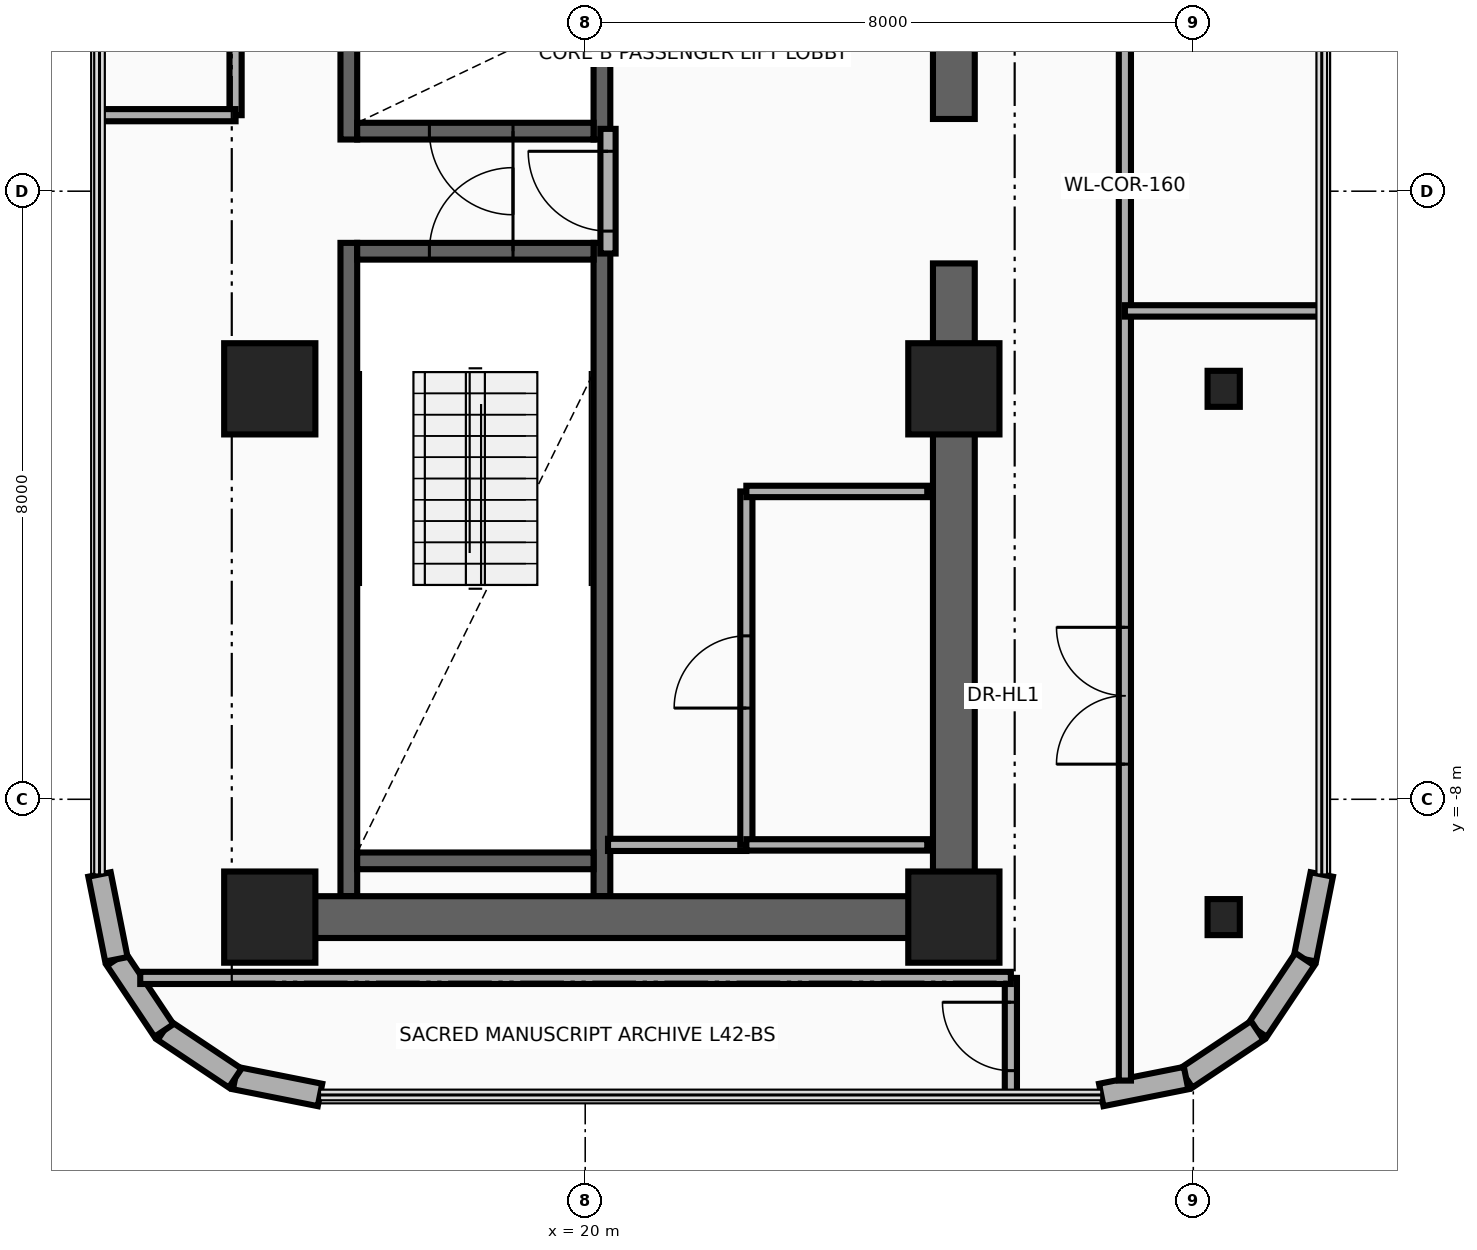
"""IFC4 building model, lengths in metres.
Left out: names, types, materials, properties, quantities, classifications, styles, units other than length and angle.
Written with IfcOpenShell. Run it as: python <this file> out.ifc"""

import sys

from ifc_helpers import new_model, si_unit, direction, frame, frame_2d, origin, origin_2d, place, context, subcontext, project, spatial, rectangle, i_section, extrude, source, transform, mapped, element, fill, save


model = new_model("IFC4")
c1 = context("Model", 3, precision=1e-05, world=origin(), true_north=direction((0.0, 1.0)))
c2 = subcontext(c1, "Body", "Model", "MODEL_VIEW")
j1 = project(units=[si_unit("LENGTHUNIT", "METRE"), si_unit("PLANEANGLEUNIT", "RADIAN")], contexts=[c1])
p1 = place(None, origin())
s1 = spatial("IfcSite", under=j1, at=p1, CompositionType="ELEMENT")
p2 = place(p1, origin())
s2 = spatial("IfcBuilding", under=s1, at=p2, CompositionType="ELEMENT")
p3 = place(p2, frame((0.0, 0.0, 164.9)))
s3 = spatial("IfcBuildingStorey", under=s2, at=p3, CompositionType="ELEMENT", Elevation=164.9)
for number, where, z_axis, x_axis in (
    (1, (16.89, 0.68, 0.0), (0.0, 0.0, 1.0), (0.0, 1.0, 0.0)),
    (2, (20.22, 0.68, 0.0), (0.0, 0.0, 1.0), (0.0, 1.0, 0.0)),
):
    element("IfcWall", number, at=place(p3, frame(where, z_axis=z_axis, x_axis=x_axis)), inside=s3, PredefinedType="SHEAR", context=c2, shape_type="SweptSolid", body=[
        extrude(rectangle(XDim=8.595, YDim=0.22, at=frame_2d((4.297, 0.0))), origin(), (0.0, 0.0, 1.0), 3.46),
    ])
p4 = place(p3, frame((17.0, 0.79, 0.0), z_axis=(0.0, 0.0, 1.0), x_axis=(1.0, 0.0, 0.0)))
e3 = element("IfcWall", 3, at=p4, inside=s3, PredefinedType="SHEAR", context=c2, shape_type="SweptSolid", body=[
    extrude(rectangle(XDim=3.11, YDim=0.22, at=frame_2d((1.555, 0.0))), origin(), (0.0, 0.0, 1.0), 3.46),
])
p5 = place(p4, frame((0.95, 0.0, 0.0)))
e4 = element("IfcOpeningElement", 4, at=p5, cuts=e3, PredefinedType="OPENING", context=c2, shape_type="SweptSolid", body=[
    extrude(rectangle(XDim=1.1, YDim=2.15, at=frame_2d((0.55, 1.075))), frame((0.0, 0.125, 0.0), z_axis=(0.0, -1.0, 0.0), x_axis=(1.0, 0.0, 0.0)), (0.0, 0.0, 1.0), 0.25),
])
for number, where, z_axis, x_axis in (
    (5, (16.89, -9.275, 0.0), (0.0, 0.0, 1.0), (0.0, 1.0, 0.0)),
    (6, (20.22, -9.275, 0.0), (0.0, 0.0, 1.0), (0.0, 1.0, 0.0)),
):
    element("IfcWall", number, at=place(p3, frame(where, z_axis=z_axis, x_axis=x_axis)), inside=s3, PredefinedType="SHEAR", context=c2, shape_type="SweptSolid", body=[
        extrude(rectangle(XDim=8.595, YDim=0.22, at=frame_2d((4.297, 0.0))), origin(), (0.0, 0.0, 1.0), 3.46),
    ])
p6 = place(p3, frame((17.0, -8.81, 0.0), z_axis=(0.0, 0.0, 1.0), x_axis=(1.0, 0.0, 0.0)))
e7 = element("IfcWall", 7, at=p6, inside=s3, PredefinedType="SHEAR", context=c2, shape_type="SweptSolid", body=[
    extrude(rectangle(XDim=3.11, YDim=0.22, at=frame_2d((1.555, 0.0))), origin(), (0.0, 0.0, 1.0), 3.46),
])
p7 = place(p3, frame((17.0, -0.79, 0.0), z_axis=(0.0, 0.0, 1.0), x_axis=(1.0, 0.0, 0.0)))
e8 = element("IfcWall", 8, at=p7, inside=s3, PredefinedType="SHEAR", context=c2, shape_type="SweptSolid", body=[
    extrude(rectangle(XDim=3.11, YDim=0.22, at=frame_2d((1.555, 0.0))), origin(), (0.0, 0.0, 1.0), 3.46),
])
p8 = place(p7, frame((0.95, 0.0, 0.0)))
e9 = element("IfcOpeningElement", 9, at=p8, cuts=e8, PredefinedType="OPENING", context=c2, shape_type="SweptSolid", body=[
    extrude(rectangle(XDim=1.1, YDim=2.15, at=frame_2d((0.55, 1.075))), frame((0.0, 0.125, 0.0), z_axis=(0.0, -1.0, 0.0), x_axis=(1.0, 0.0, 0.0)), (0.0, 0.0, 1.0), 0.25),
])
for number, where, z_axis, x_axis in (
    (10, (24.85, -9.825, 0.0), (0.0, 0.0, 1.0), (0.0, 1.0, 0.0)),
    (11, (24.85, 0.95, 0.0), (0.0, 0.0, 1.0), (0.0, 1.0, 0.0)),
):
    element("IfcWall", number, at=place(p3, frame(where, z_axis=z_axis, x_axis=x_axis)), inside=s3, PredefinedType="SHEAR", context=c2, shape_type="SweptSolid", body=[
        extrude(rectangle(XDim=8.875, YDim=0.55, at=frame_2d((4.438, 0.0))), origin(), (0.0, 0.0, 1.0), 3.46),
    ])
p9 = place(p3, frame((15.85, -9.55, 0.0), z_axis=(0.0, 0.0, 1.0), x_axis=(1.0, 0.0, 0.0)))
e12 = element("IfcWall", 12, at=p9, inside=s3, PredefinedType="SHEAR", context=c2, shape_type="SweptSolid", body=[
    extrude(rectangle(XDim=9.0, YDim=0.55, at=frame_2d((4.5, 0.0))), origin(), (0.0, 0.0, 1.0), 3.46),
])
m1 = source(origin(), c2, "Body", "SweptSolid", [
    extrude(rectangle(XDim=1.2, YDim=1.2, at=origin_2d()), origin(), (0.0, 0.0, 1.0), 3.7),
])
for number, where, z_axis, x_axis in (
    (13, (15.85, -9.55, 0.0), (0.0, 0.0, 1.0), (1.0, 0.0, 0.0)),
    (14, (24.85, -9.55, 0.0), (0.0, 0.0, 1.0), (1.0, 0.0, 0.0)),
):
    element("IfcColumn", number, at=place(p3, frame(where, z_axis=z_axis, x_axis=x_axis)), inside=s3, PredefinedType="COLUMN", context=c2, shape_type="MappedRepresentation", body=[
        mapped(m1, transform((0.0, 0.0, 0.0), x_axis=(1.0, 0.0, 0.0), y_axis=(0.0, 1.0, 0.0), z_axis=(0.0, 0.0, 1.0), scale=1.0)),
    ])
m2 = source(origin(), c2, "Body", "SweptSolid", [
    extrude(i_section(OverallWidth=0.424, OverallDepth=0.474, WebThickness=0.048, FlangeThickness=0.077, at=origin_2d()), origin(), (0.0, 0.0, 1.0), 3.7),
])
p10 = place(p3, frame((28.4, -9.55, 0.0), z_axis=(0.0, 0.0, 1.0), x_axis=(1.0, 0.0, 0.0)))
e15 = element("IfcColumn", 15, at=p10, inside=s3, PredefinedType="COLUMN", context=c2, shape_type="MappedRepresentation", body=[
    mapped(m2, transform((0.0, 0.0, 0.0), x_axis=(1.0, 0.0, 0.0), y_axis=(0.0, 1.0, 0.0), z_axis=(0.0, 0.0, 1.0), scale=1.0)),
])
for number, where, z_axis, x_axis in (
    (16, (15.85, -2.6, 0.0), (0.0, 0.0, 1.0), (1.0, 0.0, 0.0)),
    (17, (24.85, -2.6, 0.0), (0.0, 0.0, 1.0), (1.0, 0.0, 0.0)),
):
    element("IfcColumn", number, at=place(p3, frame(where, z_axis=z_axis, x_axis=x_axis)), inside=s3, PredefinedType="COLUMN", context=c2, shape_type="MappedRepresentation", body=[
        mapped(m1, transform((0.0, 0.0, 0.0), x_axis=(1.0, 0.0, 0.0), y_axis=(0.0, 1.0, 0.0), z_axis=(0.0, 0.0, 1.0), scale=1.0)),
    ])
p11 = place(p3, frame((28.4, -2.6, 0.0), z_axis=(0.0, 0.0, 1.0), x_axis=(1.0, 0.0, 0.0)))
e18 = element("IfcColumn", 18, at=p11, inside=s3, PredefinedType="COLUMN", context=c2, shape_type="MappedRepresentation", body=[
    mapped(m2, transform((0.0, 0.0, 0.0), x_axis=(1.0, 0.0, 0.0), y_axis=(0.0, 1.0, 0.0), z_axis=(0.0, 0.0, 1.0), scale=1.0)),
])
p12 = place(p3, frame((29.69, -8.989, 0.0), z_axis=(0.0, 0.0, 1.0), x_axis=(-0.195043173023, -0.980794657743, 0.0)))
e19 = element("IfcWall", 19, at=p12, inside=s3, PredefinedType="SOLIDWALL", context=c2, shape_type="SweptSolid", body=[
    extrude(rectangle(XDim=1.138, YDim=0.3, at=frame_2d((0.569, 0.0))), origin(), (0.0, 0.0, 1.0), 3.46),
])
for number, where, z_axis, x_axis in (
    (20, (29.468, -10.105, 0.0), (0.0, 0.0, 1.0), (-0.556, -0.831, 0.0)),
    (21, (28.842, -11.042, 0.0), (0.0, 0.0, 1.0), (-0.831, -0.556, 0.0)),
):
    element("IfcWall", number, at=place(p3, frame(where, z_axis=z_axis, x_axis=x_axis)), inside=s3, PredefinedType="SOLIDWALL", context=c2, shape_type="SweptSolid", body=[
        extrude(rectangle(XDim=1.127, YDim=0.3, at=frame_2d((0.563, 0.0))), origin(), (0.0, 0.0, 1.0), 3.46),
    ])
for number, where, z_axis, x_axis in (
    (22, (27.905, -11.668, 0.0), (0.0, 0.0, 1.0), (-0.981, -0.195, 0.0)),
    (23, (16.511, -11.89, 0.0), (0.0, 0.0, 1.0), (-0.981, 0.195, 0.0)),
):
    element("IfcWall", number, at=place(p3, frame(where, z_axis=z_axis, x_axis=x_axis)), inside=s3, PredefinedType="SOLIDWALL", context=c2, shape_type="SweptSolid", body=[
        extrude(rectangle(XDim=1.138, YDim=0.3, at=frame_2d((0.569, 0.0))), origin(), (0.0, 0.0, 1.0), 3.46),
    ])
for number, where, z_axis, x_axis in (
    (24, (15.395, -11.668, 0.0), (0.0, 0.0, 1.0), (-0.831, 0.556, 0.0)),
    (25, (14.458, -11.042, 0.0), (0.0, 0.0, 1.0), (-0.556, 0.831, 0.0)),
):
    element("IfcWall", number, at=place(p3, frame(where, z_axis=z_axis, x_axis=x_axis)), inside=s3, PredefinedType="SOLIDWALL", context=c2, shape_type="SweptSolid", body=[
        extrude(rectangle(XDim=1.127, YDim=0.3, at=frame_2d((0.563, 0.0))), origin(), (0.0, 0.0, 1.0), 3.46),
    ])
p13 = place(p3, frame((13.832, -10.105, 0.0), z_axis=(0.0, 0.0, 1.0), x_axis=(-0.195043173023, 0.980794657743, 0.0)))
e26 = element("IfcWall", 26, at=p13, inside=s3, PredefinedType="SOLIDWALL", context=c2, shape_type="SweptSolid", body=[
    extrude(rectangle(XDim=1.138, YDim=0.3, at=frame_2d((0.569, 0.0))), origin(), (0.0, 0.0, 1.0), 3.46),
])
p14 = place(p3, frame((20.3, -0.82, 0.0), z_axis=(0.0, 0.0, 1.0), x_axis=(0.0, 1.0, 0.0)))
e27 = element("IfcWall", 27, at=p14, inside=s3, PredefinedType="PARTITIONING", context=c2, shape_type="SweptSolid", body=[
    extrude(rectangle(XDim=1.64, YDim=0.2, at=frame_2d((0.82, 0.0))), origin(), (0.0, 0.0, 1.0), 3.46),
])
p15 = place(p14, frame((0.295, 0.0, 0.0)))
e28 = element("IfcOpeningElement", 28, at=p15, cuts=e27, PredefinedType="OPENING", context=c2, shape_type="SweptSolid", body=[
    extrude(rectangle(XDim=1.05, YDim=2.15, at=frame_2d((0.525, 1.075))), frame((0.0, 0.115, 0.0), z_axis=(0.0, -1.0, 0.0), x_axis=(1.0, 0.0, 0.0)), (0.0, 0.0, 1.0), 0.23),
])
p16 = place(p3, frame((20.3, -8.6, 0.0), z_axis=(0.0, 0.0, 1.0), x_axis=(1.0, 0.0, 0.0)))
e29 = element("IfcWall", 29, at=p16, inside=s3, PredefinedType="PARTITIONING", context=c2, shape_type="SweptSolid", body=[
    extrude(rectangle(XDim=1.82, YDim=0.16, at=frame_2d((0.91, 0.0))), origin(), (0.0, 0.0, 1.0), 3.46),
])
p17 = place(p3, frame((22.12, -8.6, 0.0), z_axis=(0.0, 0.0, 1.0), x_axis=(0.0, 1.0, 0.0)))
e30 = element("IfcWall", 30, at=p17, inside=s3, PredefinedType="PARTITIONING", context=c2, shape_type="SweptSolid", body=[
    extrude(rectangle(XDim=4.65, YDim=0.16, at=frame_2d((2.325, 0.0))), origin(), (0.0, 0.0, 1.0), 3.46),
])
p18 = place(p17, frame((1.8, 0.0, 0.0)))
e31 = element("IfcOpeningElement", 31, at=p18, cuts=e30, PredefinedType="OPENING", context=c2, shape_type="SweptSolid", body=[
    extrude(rectangle(XDim=0.95, YDim=2.15, at=frame_2d((0.475, 1.075))), frame((0.0, 0.095, 0.0), z_axis=(0.0, -1.0, 0.0), x_axis=(1.0, 0.0, 0.0)), (0.0, 0.0, 1.0), 0.19),
])
for number, where, z_axis, x_axis in (
    (32, (22.12, -3.95, 0.0), (0.0, 0.0, 1.0), (1.0, 0.0, 0.0)),
    (33, (22.12, -8.6, 0.0), (0.0, 0.0, 1.0), (1.0, 0.0, 0.0)),
):
    element("IfcWall", number, at=place(p3, frame(where, z_axis=z_axis, x_axis=x_axis)), inside=s3, PredefinedType="PARTITIONING", context=c2, shape_type="SweptSolid", body=[
        extrude(rectangle(XDim=2.38, YDim=0.15, at=frame_2d((1.19, 0.0))), origin(), (0.0, 0.0, 1.0), 3.46),
    ])
p19 = place(p3, frame((25.6, -11.89, 0.0), z_axis=(0.0, 0.0, 1.0), x_axis=(0.0, 1.0, 0.0)))
e34 = element("IfcWall", 34, at=p19, inside=s3, PredefinedType="PARTITIONING", context=c2, shape_type="SweptSolid", body=[
    extrude(rectangle(XDim=1.54, YDim=0.16, at=frame_2d((0.77, 0.0))), origin(), (0.0, 0.0, 1.0), 3.46),
])
p20 = place(p19, frame((0.32, 0.0, 0.0)))
e35 = element("IfcOpeningElement", 35, at=p20, cuts=e34, PredefinedType="OPENING", context=c2, shape_type="SweptSolid", body=[
    extrude(rectangle(XDim=0.9, YDim=2.1, at=frame_2d((0.45, 1.05))), frame((0.0, 0.095, 0.0), z_axis=(0.0, -1.0, 0.0), x_axis=(1.0, 0.0, 0.0)), (0.0, 0.0, 1.0), 0.19),
])
p21 = place(p3, frame((14.146, -10.35, 0.0), z_axis=(0.0, 0.0, 1.0), x_axis=(1.0, 0.0, 0.0)))
e36 = element("IfcWall", 36, at=p21, inside=s3, PredefinedType="PARTITIONING", context=c2, shape_type="SweptSolid", body=[
    extrude(rectangle(XDim=11.454, YDim=0.16, at=frame_2d((5.727, 0.0))), origin(), (0.0, 0.0, 1.0), 3.46),
])
p22 = place(p3, frame((27.1, -11.701, 0.0), z_axis=(0.0, 0.0, 1.0), x_axis=(0.0, 1.0, 0.0)))
e37 = element("IfcWall", 37, at=p22, inside=s3, PredefinedType="PARTITIONING", context=c2, shape_type="SweptSolid", body=[
    extrude(rectangle(XDim=23.551, YDim=0.16, at=frame_2d((11.775, 0.0))), origin(), (0.0, 0.0, 1.0), 2.666),
])
p23 = place(p22, frame((4.163, 0.0, 0.0)))
e38 = element("IfcOpeningElement", 38, at=p23, cuts=e37, PredefinedType="OPENING", context=c2, shape_type="SweptSolid", body=[
    extrude(rectangle(XDim=1.8, YDim=2.15, at=frame_2d((0.9, 1.075))), frame((0.0, 0.095, 0.0), z_axis=(0.0, -1.0, 0.0), x_axis=(1.0, 0.0, 0.0)), (0.0, 0.0, 1.0), 0.19),
])
p24 = place(p22, frame((15.938, 0.0, 0.0)))
e39 = element("IfcOpeningElement", 39, at=p24, cuts=e37, PredefinedType="OPENING", context=c2, shape_type="SweptSolid", body=[
    extrude(rectangle(XDim=1.8, YDim=2.15, at=frame_2d((0.9, 1.075))), frame((0.0, 0.095, 0.0), z_axis=(0.0, -1.0, 0.0), x_axis=(1.0, 0.0, 0.0)), (0.0, 0.0, 1.0), 0.19),
])
p25 = place(p3, frame((27.1, -1.575, 0.0), z_axis=(0.0, 0.0, 1.0), x_axis=(1.0, 0.0, 0.0)))
e40 = element("IfcWall", 40, at=p25, inside=s3, PredefinedType="PARTITIONING", context=c2, shape_type="SweptSolid", body=[
    extrude(rectangle(XDim=2.59, YDim=0.15, at=frame_2d((1.295, 0.0))), origin(), (0.0, 0.0, 1.0), 2.896),
])
p26 = place(p3, frame((15.4, 1.0, 0.0), z_axis=(0.0, 0.0, 1.0), x_axis=(0.0, 1.0, 0.0)))
e41 = element("IfcWall", 41, at=p26, inside=s3, PredefinedType="PARTITIONING", context=c2, shape_type="SweptSolid", body=[
    extrude(rectangle(XDim=9.35, YDim=0.16, at=frame_2d((4.675, 0.0))), origin(), (0.0, 0.0, 1.0), 3.46),
])
p27 = place(p3, frame((13.61, 1.0, 0.0), z_axis=(0.0, 0.0, 1.0), x_axis=(1.0, 0.0, 0.0)))
e42 = element("IfcWall", 42, at=p27, inside=s3, PredefinedType="PARTITIONING", context=c2, shape_type="SweptSolid", body=[
    extrude(rectangle(XDim=1.79, YDim=0.16, at=frame_2d((0.895, 0.0))), origin(), (0.0, 0.0, 1.0), 3.46),
])
p28 = place(p15, origin())
e43 = element("IfcDoor", 43, at=p28, inside=s3, OperationType="SINGLE_SWING_RIGHT", PredefinedType="DOOR", context=c2, shape_type="SweptSolid", body=[
    extrude(rectangle(XDim=1.05, YDim=2.15, at=frame_2d((0.525, 1.075))), frame((0.0, 0.025, 0.0), z_axis=(0.0, -1.0, 0.0), x_axis=(1.0, 0.0, 0.0)), (0.0, 0.0, 1.0), 0.05),
])
fill(e28, e43)
p29 = place(p5, frame((1.1, 0.0, 0.0), z_axis=(0.0, 0.0, 1.0), x_axis=(-1.0, 0.0, 0.0)))
e44 = element("IfcDoor", 44, at=p29, inside=s3, OperationType="SINGLE_SWING_LEFT", PredefinedType="DOOR", context=c2, shape_type="SweptSolid", body=[
    extrude(rectangle(XDim=1.1, YDim=2.15, at=frame_2d((0.55, 1.075))), frame((0.0, 0.025, 0.0), z_axis=(0.0, -1.0, 0.0), x_axis=(1.0, 0.0, 0.0)), (0.0, 0.0, 1.0), 0.05),
])
fill(e4, e44)
p30 = place(p8, origin())
e45 = element("IfcDoor", 45, at=p30, inside=s3, OperationType="SINGLE_SWING_RIGHT", PredefinedType="DOOR", context=c2, shape_type="SweptSolid", body=[
    extrude(rectangle(XDim=1.1, YDim=2.15, at=frame_2d((0.55, 1.075))), frame((0.0, 0.025, 0.0), z_axis=(0.0, -1.0, 0.0), x_axis=(1.0, 0.0, 0.0)), (0.0, 0.0, 1.0), 0.05),
])
fill(e9, e45)
p31 = place(p18, origin())
e46 = element("IfcDoor", 46, at=p31, inside=s3, OperationType="SINGLE_SWING_RIGHT", PredefinedType="DOOR", context=c2, shape_type="SweptSolid", body=[
    extrude(rectangle(XDim=0.95, YDim=2.15, at=frame_2d((0.475, 1.075))), frame((0.0, 0.025, 0.0), z_axis=(0.0, -1.0, 0.0), x_axis=(1.0, 0.0, 0.0)), (0.0, 0.0, 1.0), 0.05),
])
fill(e31, e46)
p32 = place(p20, origin())
e47 = element("IfcDoor", 47, at=p32, inside=s3, OperationType="SINGLE_SWING_RIGHT", PredefinedType="DOOR", context=c2, shape_type="SweptSolid", body=[
    extrude(rectangle(XDim=0.9, YDim=2.1, at=frame_2d((0.45, 1.05))), frame((0.0, 0.025, 0.0), z_axis=(0.0, -1.0, 0.0), x_axis=(1.0, 0.0, 0.0)), (0.0, 0.0, 1.0), 0.05),
])
fill(e35, e47)
p33 = place(p23, origin())
e48 = element("IfcDoor", 48, at=p33, inside=s3, OperationType="DOUBLE_DOOR_SINGLE_SWING", PredefinedType="DOOR", context=c2, shape_type="SweptSolid", body=[
    extrude(rectangle(XDim=1.8, YDim=2.15, at=frame_2d((0.9, 1.075))), frame((0.0, 0.025, 0.0), z_axis=(0.0, -1.0, 0.0), x_axis=(1.0, 0.0, 0.0)), (0.0, 0.0, 1.0), 0.05),
])
fill(e38, e48)
save(model, sys.argv[1])
